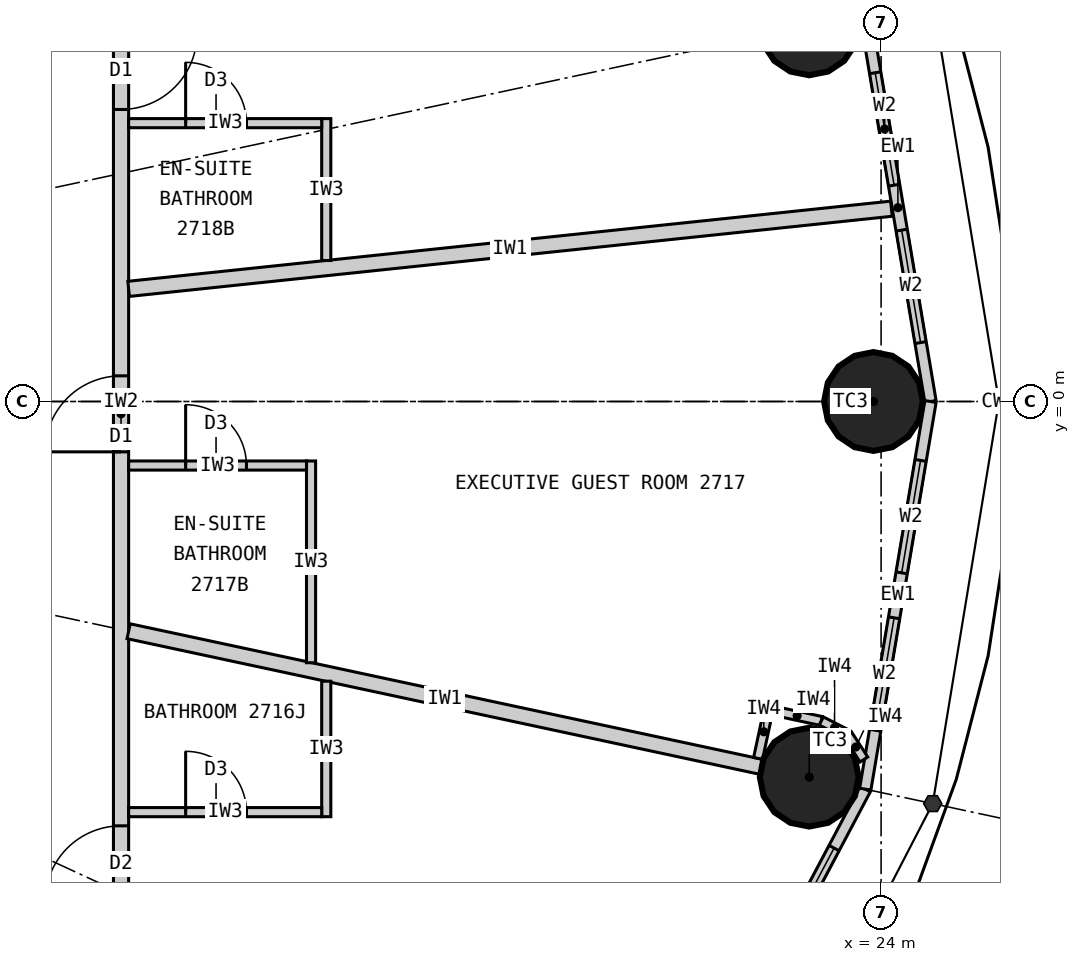
"""IFC4 building model, lengths in metres.
Left out: names, types, materials, properties, quantities, classifications, styles, units other than length and angle.
Written with IfcOpenShell. Run it as: python <this file> out.ifc"""

import sys

from ifc_helpers import new_model, si_unit, direction, frame, frame_2d, origin, origin_2d, place, context, subcontext, project, spatial, rectangle, circle, extrude, element, fill, save


model = new_model("IFC4")
c1 = context("Model", 3, precision=1e-05, world=origin(), true_north=direction((0.0, 1.0)))
c2 = subcontext(c1, "Body", "Model", "MODEL_VIEW")
j1 = project(units=[si_unit("LENGTHUNIT", "METRE"), si_unit("PLANEANGLEUNIT", "RADIAN")], contexts=[c1])
p1 = place(None, origin())
s1 = spatial("IfcSite", under=j1, at=p1, CompositionType="ELEMENT")
p2 = place(p1, origin())
s2 = spatial("IfcBuilding", under=s1, at=p2, CompositionType="ELEMENT")
p3 = place(p2, frame((0.0, 0.0, 108.9)))
s3 = spatial("IfcBuildingStorey", under=s2, at=p3, CompositionType="ELEMENT", Elevation=108.9)
for number, where, z_axis, x_axis in (
    (1, (23.9, 0.0, 0.0), (0.0, 0.0, 1.0), (1.0, 0.0, 0.0)),
    (2, (23.055, 4.942, 0.0), (0.0, 0.0, 1.0), (1.0, 0.0, 0.0)),
    (3, (23.055, -4.942, 0.0), (0.0, 0.0, 1.0), (1.0, 0.0, 0.0)),
):
    element("IfcColumn", number, at=place(p3, frame(where, z_axis=z_axis, x_axis=x_axis)), inside=s3, PredefinedType="COLUMN", context=c2, shape_type="SweptSolid", body=[
        extrude(circle(Radius=0.65, at=origin_2d()), origin(), (0.0, 0.0, 1.0), 3.3),
    ])
p4 = place(p3, frame((24.65, 0.0, 0.0), z_axis=(0.0, 0.0, 1.0), x_axis=(-0.165883894218, 0.986145290329, 0.0)))
e4 = element("IfcWall", 4, at=p4, inside=s3, PredefinedType="ELEMENTEDWALL", context=c2, shape_type="SweptSolid", body=[
    extrude(rectangle(XDim=5.172, YDim=0.15, at=frame_2d((2.586, 0.0))), origin(), (0.0, 0.0, 1.0), 3.12),
])
p5 = place(p4, frame((0.786, 0.0, 0.9)))
e5 = element("IfcOpeningElement", 5, at=p5, cuts=e4, PredefinedType="OPENING", context=c2, shape_type="SweptSolid", body=[
    extrude(rectangle(XDim=1.5, YDim=1.9, at=frame_2d((0.75, 0.95))), frame((0.0, 0.085, 0.0), z_axis=(0.0, -1.0, 0.0), x_axis=(1.0, 0.0, 0.0)), (0.0, 0.0, 1.0), 0.17),
])
p6 = place(p4, frame((2.886, 0.0, 0.9)))
e6 = element("IfcOpeningElement", 6, at=p6, cuts=e4, PredefinedType="OPENING", context=c2, shape_type="SweptSolid", body=[
    extrude(rectangle(XDim=1.5, YDim=1.9, at=frame_2d((0.75, 0.95))), frame((0.0, 0.085, 0.0), z_axis=(0.0, -1.0, 0.0), x_axis=(1.0, 0.0, 0.0)), (0.0, 0.0, 1.0), 0.17),
])
p7 = place(p3, frame((21.287, -9.832, 0.0), z_axis=(0.0, 0.0, 1.0), x_axis=(0.467814388454, 0.883826735257, 0.0)))
e7 = element("IfcWall", 7, at=p7, inside=s3, PredefinedType="ELEMENTEDWALL", context=c2, shape_type="SweptSolid", body=[
    extrude(rectangle(XDim=5.354, YDim=0.15, at=frame_2d((2.677, 0.0))), origin(), (0.0, 0.0, 1.0), 3.12),
])
p8 = place(p7, frame((0.877, 0.0, 0.9)))
e8 = element("IfcOpeningElement", 8, at=p8, cuts=e7, PredefinedType="OPENING", context=c2, shape_type="SweptSolid", body=[
    extrude(rectangle(XDim=1.5, YDim=1.9, at=frame_2d((0.75, 0.95))), frame((0.0, 0.085, 0.0), z_axis=(0.0, -1.0, 0.0), x_axis=(1.0, 0.0, 0.0)), (0.0, 0.0, 1.0), 0.17),
])
p9 = place(p7, frame((2.977, 0.0, 0.9)))
e9 = element("IfcOpeningElement", 9, at=p9, cuts=e7, PredefinedType="OPENING", context=c2, shape_type="SweptSolid", body=[
    extrude(rectangle(XDim=1.5, YDim=1.9, at=frame_2d((0.75, 0.95))), frame((0.0, 0.085, 0.0), z_axis=(0.0, -1.0, 0.0), x_axis=(1.0, 0.0, 0.0)), (0.0, 0.0, 1.0), 0.17),
])
p10 = place(p3, frame((23.792, -5.1, 0.0), z_axis=(0.0, 0.0, 1.0), x_axis=(0.165883894218, 0.986145290329, 0.0)))
e10 = element("IfcWall", 10, at=p10, inside=s3, PredefinedType="ELEMENTEDWALL", context=c2, shape_type="SweptSolid", body=[
    extrude(rectangle(XDim=5.172, YDim=0.15, at=frame_2d((2.586, 0.0))), origin(), (0.0, 0.0, 1.0), 3.12),
])
p11 = place(p10, frame((0.786, 0.0, 0.9)))
e11 = element("IfcOpeningElement", 11, at=p11, cuts=e10, PredefinedType="OPENING", context=c2, shape_type="SweptSolid", body=[
    extrude(rectangle(XDim=1.5, YDim=1.9, at=frame_2d((0.75, 0.95))), frame((0.0, 0.085, 0.0), z_axis=(0.0, -1.0, 0.0), x_axis=(1.0, 0.0, 0.0)), (0.0, 0.0, 1.0), 0.17),
])
p12 = place(p10, frame((2.886, 0.0, 0.9)))
e12 = element("IfcOpeningElement", 12, at=p12, cuts=e10, PredefinedType="OPENING", context=c2, shape_type="SweptSolid", body=[
    extrude(rectangle(XDim=1.5, YDim=1.9, at=frame_2d((0.75, 0.95))), frame((0.0, 0.085, 0.0), z_axis=(0.0, -1.0, 0.0), x_axis=(1.0, 0.0, 0.0)), (0.0, 0.0, 1.0), 0.17),
])
p13 = place(p3, frame((14.0, -9.9, 0.0), z_axis=(0.0, 0.0, 1.0), x_axis=(0.0, 1.0, 0.0)))
e13 = element("IfcWall", 13, at=p13, inside=s3, PredefinedType="PARTITIONING", context=c2, shape_type="SweptSolid", body=[
    extrude(rectangle(XDim=19.8, YDim=0.2, at=frame_2d((9.9, 0.0))), origin(), (0.0, 0.0, 1.0), 3.12),
])
p14 = place(p13, frame((3.318, 0.0, 0.0)))
e14 = element("IfcOpeningElement", 14, at=p14, cuts=e13, PredefinedType="OPENING", context=c2, shape_type="SweptSolid", body=[
    extrude(rectangle(XDim=1.0, YDim=2.2, at=frame_2d((0.5, 1.1))), frame((0.0, 0.11, 0.0), z_axis=(0.0, -1.0, 0.0), x_axis=(1.0, 0.0, 0.0)), (0.0, 0.0, 1.0), 0.22),
])
p15 = place(p13, frame((9.238, 0.0, 0.0)))
e15 = element("IfcOpeningElement", 15, at=p15, cuts=e13, PredefinedType="OPENING", context=c2, shape_type="SweptSolid", body=[
    extrude(rectangle(XDim=1.0, YDim=2.2, at=frame_2d((0.5, 1.1))), frame((0.0, 0.11, 0.0), z_axis=(0.0, -1.0, 0.0), x_axis=(1.0, 0.0, 0.0)), (0.0, 0.0, 1.0), 0.22),
])
p16 = place(p13, frame((13.742, 0.0, 0.0)))
e16 = element("IfcOpeningElement", 16, at=p16, cuts=e13, PredefinedType="OPENING", context=c2, shape_type="SweptSolid", body=[
    extrude(rectangle(XDim=1.0, YDim=2.2, at=frame_2d((0.5, 1.1))), frame((0.0, 0.11, 0.0), z_axis=(0.0, -1.0, 0.0), x_axis=(1.0, 0.0, 0.0)), (0.0, 0.0, 1.0), 0.22),
])
p17 = place(p13, frame((18.698, 0.0, 0.0)))
e17 = element("IfcOpeningElement", 17, at=p17, cuts=e13, PredefinedType="OPENING", context=c2, shape_type="SweptSolid", body=[
    extrude(rectangle(XDim=1.0, YDim=2.2, at=frame_2d((0.5, 1.1))), frame((0.0, 0.11, 0.0), z_axis=(0.0, -1.0, 0.0), x_axis=(1.0, 0.0, 0.0)), (0.0, 0.0, 1.0), 0.22),
])
p18 = place(p3, frame((14.1, 1.482, 0.0), z_axis=(0.0, 0.0, 1.0), x_axis=(0.994523202615, 0.104516024894, 0.0)))
e18 = element("IfcWall", 18, at=p18, inside=s3, PredefinedType="PARTITIONING", context=c2, shape_type="SweptSolid", body=[
    extrude(rectangle(XDim=10.091, YDim=0.2, at=frame_2d((5.045, 0.0))), origin(), (0.0, 0.0, 1.0), 2.47),
])
p19 = place(p3, frame((14.1, -3.022, 0.0), z_axis=(0.0, 0.0, 1.0), x_axis=(0.977783513367, -0.209617272638, 0.0)))
e19 = element("IfcWall", 19, at=p19, inside=s3, PredefinedType="PARTITIONING", context=c2, shape_type="SweptSolid", body=[
    extrude(rectangle(XDim=8.508, YDim=0.2, at=frame_2d((4.254, 0.0))), origin(), (0.0, 0.0, 1.0), 2.37),
])
p20 = place(p3, frame((16.7, -3.68, 0.0), z_axis=(0.0, 0.0, 1.0), x_axis=(0.0, -1.0, 0.0)))
e20 = element("IfcWall", 20, at=p20, inside=s3, PredefinedType="PARTITIONING", context=c2, shape_type="SweptSolid", body=[
    extrude(rectangle(XDim=1.783, YDim=0.12, at=frame_2d((0.891, 0.0))), origin(), (0.0, 0.0, 1.0), 3.12),
])
p21 = place(p3, frame((14.1, -5.403, 0.0), z_axis=(0.0, 0.0, 1.0), x_axis=(1.0, 0.0, 0.0)))
e21 = element("IfcWall", 21, at=p21, inside=s3, PredefinedType="PARTITIONING", context=c2, shape_type="SweptSolid", body=[
    extrude(rectangle(XDim=2.54, YDim=0.12, at=frame_2d((1.27, 0.0))), origin(), (0.0, 0.0, 1.0), 3.12),
])
p22 = place(p21, frame((0.75, 0.0, 0.0)))
e22 = element("IfcOpeningElement", 22, at=p22, cuts=e21, PredefinedType="OPENING", context=c2, shape_type="SweptSolid", body=[
    extrude(rectangle(XDim=0.8, YDim=2.1, at=frame_2d((0.4, 1.05))), frame((0.0, 0.07, 0.0), z_axis=(0.0, -1.0, 0.0), x_axis=(1.0, 0.0, 0.0)), (0.0, 0.0, 1.0), 0.14),
])
p23 = place(p3, frame((16.5, -3.437, 0.0), z_axis=(0.0, 0.0, 1.0), x_axis=(0.0, 1.0, 0.0)))
e23 = element("IfcWall", 23, at=p23, inside=s3, PredefinedType="PARTITIONING", context=c2, shape_type="SweptSolid", body=[
    extrude(rectangle(XDim=2.655, YDim=0.12, at=frame_2d((1.327, 0.0))), origin(), (0.0, 0.0, 1.0), 3.12),
])
p24 = place(p3, frame((14.1, -0.843, 0.0), z_axis=(0.0, 0.0, 1.0), x_axis=(1.0, 0.0, 0.0)))
e24 = element("IfcWall", 24, at=p24, inside=s3, PredefinedType="PARTITIONING", context=c2, shape_type="SweptSolid", body=[
    extrude(rectangle(XDim=2.34, YDim=0.12, at=frame_2d((1.17, 0.0))), origin(), (0.0, 0.0, 1.0), 3.12),
])
p25 = place(p24, frame((0.75, 0.0, 0.0)))
e25 = element("IfcOpeningElement", 25, at=p25, cuts=e24, PredefinedType="OPENING", context=c2, shape_type="SweptSolid", body=[
    extrude(rectangle(XDim=0.8, YDim=2.1, at=frame_2d((0.4, 1.05))), frame((0.0, 0.07, 0.0), z_axis=(0.0, -1.0, 0.0), x_axis=(1.0, 0.0, 0.0)), (0.0, 0.0, 1.0), 0.14),
])
p26 = place(p3, frame((16.7, 1.855, 0.0), z_axis=(0.0, 0.0, 1.0), x_axis=(0.0, 1.0, 0.0)))
e26 = element("IfcWall", 26, at=p26, inside=s3, PredefinedType="PARTITIONING", context=c2, shape_type="SweptSolid", body=[
    extrude(rectangle(XDim=1.867, YDim=0.12, at=frame_2d((0.933, 0.0))), origin(), (0.0, 0.0, 1.0), 3.12),
])
p27 = place(p3, frame((14.1, 3.662, 0.0), z_axis=(0.0, 0.0, 1.0), x_axis=(1.0, 0.0, 0.0)))
e27 = element("IfcWall", 27, at=p27, inside=s3, PredefinedType="PARTITIONING", context=c2, shape_type="SweptSolid", body=[
    extrude(rectangle(XDim=2.54, YDim=0.12, at=frame_2d((1.27, 0.0))), origin(), (0.0, 0.0, 1.0), 2.37),
])
p28 = place(p27, frame((0.75, 0.0, 0.0)))
e28 = element("IfcOpeningElement", 28, at=p28, cuts=e27, PredefinedType="OPENING", context=c2, shape_type="SweptSolid", body=[
    extrude(rectangle(XDim=0.8, YDim=2.1, at=frame_2d((0.4, 1.05))), frame((0.0, 0.07, 0.0), z_axis=(0.0, -1.0, 0.0), x_axis=(1.0, 0.0, 0.0)), (0.0, 0.0, 1.0), 0.14),
])
p29 = place(p3, frame((22.382, -4.695, 0.0), z_axis=(0.0, 0.0, 1.0), x_axis=(0.209808658628, 0.977742464438, 0.0)))
e29 = element("IfcWall", 29, at=p29, inside=s3, PredefinedType="PARTITIONING", context=c2, shape_type="SweptSolid", body=[
    extrude(rectangle(XDim=0.716, YDim=0.12, at=frame_2d((0.358, 0.0))), origin(), (0.0, 0.0, 1.0), 3.12),
])
p30 = place(p3, frame((22.578, -4.067, 0.0), z_axis=(0.0, 0.0, 1.0), x_axis=(0.977802414077, -0.209529088731, 0.0)))
e30 = element("IfcWall", 30, at=p30, inside=s3, PredefinedType="PARTITIONING", context=c2, shape_type="SweptSolid", body=[
    extrude(rectangle(XDim=0.65, YDim=0.12, at=frame_2d((0.325, 0.0))), origin(), (0.0, 0.0, 1.0), 3.12),
])
for number, where, z_axis, x_axis in (
    (31, (23.213, -4.203, 0.0), (0.0, 0.0, 1.0), (0.89, -0.456, 0.0)),
    (32, (23.562, -4.381, 0.0), (0.0, 0.0, 1.0), (0.543, -0.84, 0.0)),
):
    element("IfcWall", number, at=place(p3, frame(where, z_axis=z_axis, x_axis=x_axis)), inside=s3, PredefinedType="PARTITIONING", context=c2, shape_type="SweptSolid", body=[
        extrude(rectangle(XDim=0.391, YDim=0.12, at=frame_2d((0.196, 0.0))), origin(), (0.0, 0.0, 1.0), 3.12),
    ])
p31 = place(p5, origin())
e33 = element("IfcWindow", 33, at=p31, inside=s3, PartitioningType="SINGLE_PANEL", PredefinedType="WINDOW", context=c2, shape_type="SweptSolid", body=[
    extrude(rectangle(XDim=1.5, YDim=1.9, at=frame_2d((0.75, 0.95))), frame((0.0, 0.03, 0.0), z_axis=(0.0, -1.0, 0.0), x_axis=(1.0, 0.0, 0.0)), (0.0, 0.0, 1.0), 0.06),
])
fill(e5, e33)
p32 = place(p6, origin())
e34 = element("IfcWindow", 34, at=p32, inside=s3, PartitioningType="SINGLE_PANEL", PredefinedType="WINDOW", context=c2, shape_type="SweptSolid", body=[
    extrude(rectangle(XDim=1.5, YDim=1.9, at=frame_2d((0.75, 0.95))), frame((0.0, 0.03, 0.0), z_axis=(0.0, -1.0, 0.0), x_axis=(1.0, 0.0, 0.0)), (0.0, 0.0, 1.0), 0.06),
])
fill(e6, e34)
p33 = place(p9, origin())
e35 = element("IfcWindow", 35, at=p33, inside=s3, PartitioningType="SINGLE_PANEL", PredefinedType="WINDOW", context=c2, shape_type="SweptSolid", body=[
    extrude(rectangle(XDim=1.5, YDim=1.9, at=frame_2d((0.75, 0.95))), frame((0.0, 0.03, 0.0), z_axis=(0.0, -1.0, 0.0), x_axis=(1.0, 0.0, 0.0)), (0.0, 0.0, 1.0), 0.06),
])
fill(e9, e35)
p34 = place(p11, origin())
e36 = element("IfcWindow", 36, at=p34, inside=s3, PartitioningType="SINGLE_PANEL", PredefinedType="WINDOW", context=c2, shape_type="SweptSolid", body=[
    extrude(rectangle(XDim=1.5, YDim=1.9, at=frame_2d((0.75, 0.95))), frame((0.0, 0.03, 0.0), z_axis=(0.0, -1.0, 0.0), x_axis=(1.0, 0.0, 0.0)), (0.0, 0.0, 1.0), 0.06),
])
fill(e11, e36)
p35 = place(p12, origin())
e37 = element("IfcWindow", 37, at=p35, inside=s3, PartitioningType="SINGLE_PANEL", PredefinedType="WINDOW", context=c2, shape_type="SweptSolid", body=[
    extrude(rectangle(XDim=1.5, YDim=1.9, at=frame_2d((0.75, 0.95))), frame((0.0, 0.03, 0.0), z_axis=(0.0, -1.0, 0.0), x_axis=(1.0, 0.0, 0.0)), (0.0, 0.0, 1.0), 0.06),
])
fill(e12, e37)
p36 = place(p22, origin())
e38 = element("IfcDoor", 38, at=p36, inside=s3, OperationType="SINGLE_SWING_LEFT", PredefinedType="DOOR", context=c2, shape_type="SweptSolid", body=[
    extrude(rectangle(XDim=0.8, YDim=2.1, at=frame_2d((0.4, 1.05))), frame((0.0, 0.025, 0.0), z_axis=(0.0, -1.0, 0.0), x_axis=(1.0, 0.0, 0.0)), (0.0, 0.0, 1.0), 0.05),
])
fill(e22, e38)
p37 = place(p14, origin())
e39 = element("IfcDoor", 39, at=p37, inside=s3, OperationType="SINGLE_SWING_LEFT", PredefinedType="DOOR", context=c2, shape_type="SweptSolid", body=[
    extrude(rectangle(XDim=1.0, YDim=2.2, at=frame_2d((0.5, 1.1))), frame((0.0, 0.025, 0.0), z_axis=(0.0, -1.0, 0.0), x_axis=(1.0, 0.0, 0.0)), (0.0, 0.0, 1.0), 0.05),
])
fill(e14, e39)
p38 = place(p25, origin())
e40 = element("IfcDoor", 40, at=p38, inside=s3, OperationType="SINGLE_SWING_LEFT", PredefinedType="DOOR", context=c2, shape_type="SweptSolid", body=[
    extrude(rectangle(XDim=0.8, YDim=2.1, at=frame_2d((0.4, 1.05))), frame((0.0, 0.025, 0.0), z_axis=(0.0, -1.0, 0.0), x_axis=(1.0, 0.0, 0.0)), (0.0, 0.0, 1.0), 0.05),
])
fill(e25, e40)
p39 = place(p15, origin())
e41 = element("IfcDoor", 41, at=p39, inside=s3, OperationType="SINGLE_SWING_LEFT", PredefinedType="DOOR", context=c2, shape_type="SweptSolid", body=[
    extrude(rectangle(XDim=1.0, YDim=2.2, at=frame_2d((0.5, 1.1))), frame((0.0, 0.025, 0.0), z_axis=(0.0, -1.0, 0.0), x_axis=(1.0, 0.0, 0.0)), (0.0, 0.0, 1.0), 0.05),
])
fill(e15, e41)
p40 = place(p28, origin())
e42 = element("IfcDoor", 42, at=p40, inside=s3, OperationType="SINGLE_SWING_LEFT", PredefinedType="DOOR", context=c2, shape_type="SweptSolid", body=[
    extrude(rectangle(XDim=0.8, YDim=2.1, at=frame_2d((0.4, 1.05))), frame((0.0, 0.025, 0.0), z_axis=(0.0, -1.0, 0.0), x_axis=(1.0, 0.0, 0.0)), (0.0, 0.0, 1.0), 0.05),
])
fill(e28, e42)
p41 = place(p16, origin())
e43 = element("IfcDoor", 43, at=p41, inside=s3, OperationType="SINGLE_SWING_RIGHT", PredefinedType="DOOR", context=c2, shape_type="SweptSolid", body=[
    extrude(rectangle(XDim=1.0, YDim=2.2, at=frame_2d((0.5, 1.1))), frame((0.0, 0.025, 0.0), z_axis=(0.0, -1.0, 0.0), x_axis=(1.0, 0.0, 0.0)), (0.0, 0.0, 1.0), 0.05),
])
fill(e16, e43)
save(model, sys.argv[1])
